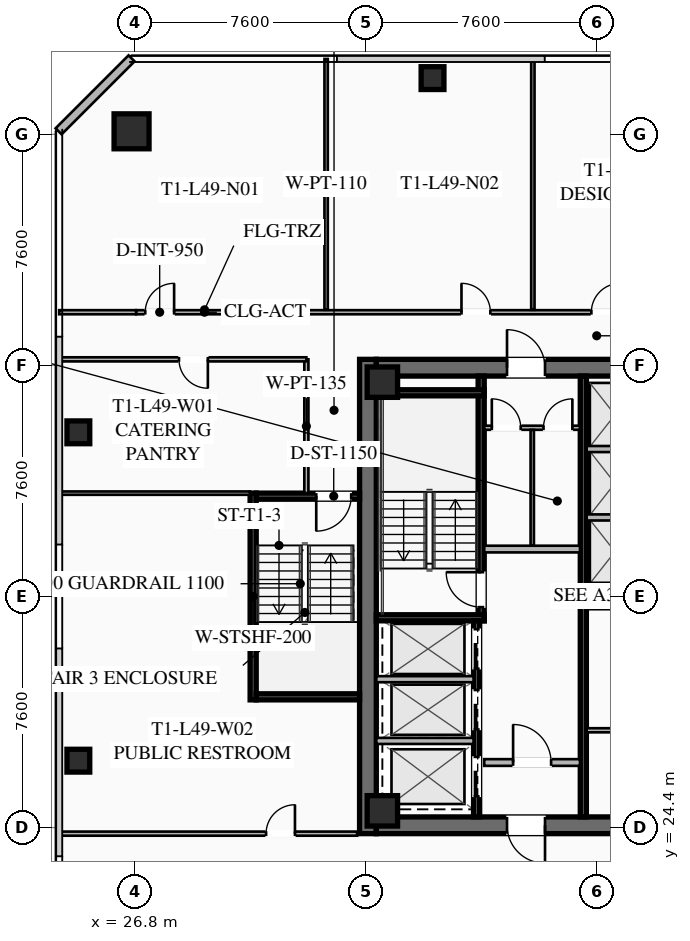
"""IFC4 building model, lengths in metres.
Left out: names, types, materials, properties, quantities, classifications, styles, units other than length and angle.
Written with IfcOpenShell. Run it as: python <this file> out.ifc"""

import sys

from ifc_helpers import new_model, si_unit, direction, frame, frame_2d, origin, origin_2d, place, context, subcontext, project, spatial, rectangle, hollow_rectangle, extrude, element, fill, save


model = new_model("IFC4")
c1 = context("Model", 3, precision=1e-05, world=origin(), true_north=direction((0.0, 1.0)))
c2 = subcontext(c1, "Body", "Model", "MODEL_VIEW")
j1 = project(units=[si_unit("LENGTHUNIT", "METRE"), si_unit("PLANEANGLEUNIT", "RADIAN")], contexts=[c1])
p1 = place(None, origin())
s1 = spatial("IfcSite", under=j1, at=p1, CompositionType="ELEMENT")
p2 = place(p1, origin())
s2 = spatial("IfcBuilding", under=s1, at=p2, CompositionType="ELEMENT")
p3 = place(p2, frame((0.0, 0.0, 181.85)))
s3 = spatial("IfcBuildingStorey", under=s2, at=p3, CompositionType="ELEMENT", Elevation=181.85)
p4 = place(p3, frame((34.475, 24.2, 0.0), z_axis=(0.0, 0.0, 1.0), x_axis=(0.0, 1.0, 0.0)))
e1 = element("IfcWall", 1, at=p4, inside=s3, PredefinedType="SHEAR", context=c2, shape_type="SweptSolid", body=[
    extrude(rectangle(XDim=15.6, YDim=0.55, at=frame_2d((7.8, 0.0))), origin(), (0.0, 0.0, 1.0), 3.55),
])
p5 = place(p3, frame((49.25, 24.475, 0.0), z_axis=(0.0, 0.0, 1.0), x_axis=(-1.0, 0.0, 0.0)))
e2 = element("IfcWall", 2, at=p5, inside=s3, PredefinedType="SHEAR", context=c2, shape_type="SweptSolid", body=[
    extrude(rectangle(XDim=14.5, YDim=0.55, at=frame_2d((7.25, 0.0))), origin(), (0.0, 0.0, 1.0), 3.55),
])
p6 = place(p5, frame((8.95, 0.0, 0.0)))
e3 = element("IfcOpeningElement", 3, at=p6, cuts=e2, PredefinedType="OPENING", context=c2, shape_type="SweptSolid", body=[
    extrude(rectangle(XDim=1.25, YDim=2.25, at=frame_2d((0.625, 1.125))), frame((0.0, 0.285, 0.0), z_axis=(0.0, -1.0, 0.0), x_axis=(1.0, 0.0, 0.0)), (0.0, 0.0, 1.0), 0.57),
])
p7 = place(p5, frame((3.9, 0.0, 0.0)))
e4 = element("IfcOpeningElement", 4, at=p7, cuts=e2, PredefinedType="OPENING", context=c2, shape_type="SweptSolid", body=[
    extrude(rectangle(XDim=1.25, YDim=2.25, at=frame_2d((0.625, 1.125))), frame((0.0, 0.285, 0.0), z_axis=(0.0, -1.0, 0.0), x_axis=(1.0, 0.0, 0.0)), (0.0, 0.0, 1.0), 0.57),
])
p8 = place(p3, frame((34.75, 39.525, 0.0), z_axis=(0.0, 0.0, 1.0), x_axis=(1.0, 0.0, 0.0)))
e5 = element("IfcWall", 5, at=p8, inside=s3, PredefinedType="SHEAR", context=c2, shape_type="SweptSolid", body=[
    extrude(rectangle(XDim=14.5, YDim=0.55, at=frame_2d((7.25, 0.0))), origin(), (0.0, 0.0, 1.0), 3.55),
])
p9 = place(p8, frame((4.3, 0.0, 0.0)))
e6 = element("IfcOpeningElement", 6, at=p9, cuts=e5, PredefinedType="OPENING", context=c2, shape_type="SweptSolid", body=[
    extrude(rectangle(XDim=1.25, YDim=2.25, at=frame_2d((0.625, 1.125))), frame((0.0, 0.285, 0.0), z_axis=(0.0, -1.0, 0.0), x_axis=(1.0, 0.0, 0.0)), (0.0, 0.0, 1.0), 0.57),
])
p10 = place(p8, frame((9.35, 0.0, 0.0)))
e7 = element("IfcOpeningElement", 7, at=p10, cuts=e5, PredefinedType="OPENING", context=c2, shape_type="SweptSolid", body=[
    extrude(rectangle(XDim=1.25, YDim=2.25, at=frame_2d((0.625, 1.125))), frame((0.0, 0.285, 0.0), z_axis=(0.0, -1.0, 0.0), x_axis=(1.0, 0.0, 0.0)), (0.0, 0.0, 1.0), 0.57),
])
for number, where, z_axis, x_axis in (
    (8, (34.95, 24.95, 0.0), (0.0, 0.0, 1.0), (1.0, 0.0, 0.0)),
    (9, (34.95, 39.05, 0.0), (0.0, 0.0, 1.0), (1.0, 0.0, 0.0)),
):
    element("IfcColumn", number, at=place(p3, frame(where, z_axis=z_axis, x_axis=x_axis)), inside=s3, PredefinedType="COLUMN", context=c2, shape_type="SweptSolid", body=[
        extrude(hollow_rectangle(XDim=1.0, YDim=1.0, WallThickness=0.04, at=origin_2d()), origin(), (0.0, 0.0, 1.0), 3.37),
    ])
p11 = place(p3, frame((26.7, 47.3, 0.0), z_axis=(0.0, 0.0, 1.0), x_axis=(1.0, 0.0, 0.0)))
e10 = element("IfcColumn", 10, at=p11, inside=s3, PredefinedType="COLUMN", context=c2, shape_type="SweptSolid", body=[
    extrude(hollow_rectangle(XDim=1.15, YDim=1.15, WallThickness=0.045, at=origin_2d()), origin(), (0.0, 0.0, 1.0), 3.37),
])
for number, where, z_axis, x_axis in (
    (11, (36.6, 49.05, 0.0), (0.0, 0.0, 1.0), (1.0, 0.0, 0.0)),
    (12, (24.95, 37.4, 0.0), (0.0, 0.0, 1.0), (1.0, 0.0, 0.0)),
    (13, (24.95, 26.6, 0.0), (0.0, 0.0, 1.0), (1.0, 0.0, 0.0)),
):
    element("IfcColumn", number, at=place(p3, frame(where, z_axis=z_axis, x_axis=x_axis)), inside=s3, PredefinedType="COLUMN", context=c2, shape_type="SweptSolid", body=[
        extrude(hollow_rectangle(XDim=0.75, YDim=0.75, WallThickness=0.032, at=origin_2d()), origin(), (0.0, 0.0, 1.0), 3.37),
    ])
p12 = place(p3, frame((24.3, 47.3, 0.0), z_axis=(0.0, 0.0, 1.0), x_axis=(0.707106781187, 0.707106781187, 0.0)))
e14 = element("IfcWall", 14, at=p12, inside=s3, PredefinedType="SOLIDWALL", context=c2, shape_type="SweptSolid", body=[
    extrude(rectangle(XDim=3.394, YDim=0.28, at=frame_2d((1.697, 0.0))), origin(), (0.0, 0.0, 1.0), 3.37),
])
p13 = place(p3, frame((38.2, 31.2, 0.0), z_axis=(0.0, 0.0, 1.0), x_axis=(0.0, 1.0, 0.0)))
e15 = element("IfcWall", 15, at=p13, inside=s3, PredefinedType="SHEAR", context=c2, shape_type="SweptSolid", body=[
    extrude(rectangle(XDim=8.05, YDim=0.2, at=frame_2d((4.025, 0.0))), origin(), (0.0, 0.0, 1.0), 3.37),
])
p14 = place(p13, frame((0.45, 0.0, 0.0)))
e16 = element("IfcOpeningElement", 16, at=p14, cuts=e15, PredefinedType="OPENING", context=c2, shape_type="SweptSolid", body=[
    extrude(rectangle(XDim=1.15, YDim=2.2, at=frame_2d((0.575, 1.1))), frame((0.0, 0.11, 0.0), z_axis=(0.0, -1.0, 0.0), x_axis=(1.0, 0.0, 0.0)), (0.0, 0.0, 1.0), 0.22),
])
for number, where, z_axis, x_axis in (
    (17, (34.75, 31.3, 0.0), (0.0, 0.0, 1.0), (1.0, 0.0, 0.0)),
    (18, (34.75, 38.7, 0.0), (0.0, 0.0, 1.0), (1.0, 0.0, 0.0)),
):
    element("IfcWall", number, at=place(p3, frame(where, z_axis=z_axis, x_axis=x_axis)), inside=s3, PredefinedType="SHEAR", context=c2, shape_type="SweptSolid", body=[
        extrude(rectangle(XDim=3.55, YDim=0.2, at=frame_2d((1.775, 0.0))), origin(), (0.0, 0.0, 1.0), 3.37),
    ])
p15 = place(p3, frame((41.56, 24.75, 0.0), z_axis=(0.0, 0.0, 1.0), x_axis=(0.0, 1.0, 0.0)))
e19 = element("IfcWall", 19, at=p15, inside=s3, PredefinedType="SHEAR", context=c2, shape_type="SweptSolid", body=[
    extrude(rectangle(XDim=14.5, YDim=0.2, at=frame_2d((7.25, 0.0))), origin(), (0.0, 0.0, 1.0), 3.37),
])
p16 = place(p3, frame((38.3, 33.56, 0.0), z_axis=(0.0, 0.0, 1.0), x_axis=(1.0, 0.0, 0.0)))
e20 = element("IfcWall", 20, at=p16, inside=s3, PredefinedType="SOLIDWALL", context=c2, shape_type="SweptSolid", body=[
    extrude(rectangle(XDim=3.15, YDim=0.22, at=frame_2d((1.575, 0.0))), origin(), (0.0, 0.0, 1.0), 2.723),
])
p17 = place(p3, frame((38.3, 26.54, 0.0), z_axis=(0.0, 0.0, 1.0), x_axis=(1.0, 0.0, 0.0)))
e21 = element("IfcWall", 21, at=p17, inside=s3, PredefinedType="SOLIDWALL", context=c2, shape_type="SweptSolid", body=[
    extrude(rectangle(XDim=3.15, YDim=0.22, at=frame_2d((1.575, 0.0))), origin(), (0.0, 0.0, 1.0), 2.723),
])
p18 = place(p17, frame((0.95, 0.0, 0.0)))
e22 = element("IfcOpeningElement", 22, at=p18, cuts=e21, PredefinedType="OPENING", context=c2, shape_type="SweptSolid", body=[
    extrude(rectangle(XDim=1.25, YDim=2.25, at=frame_2d((0.625, 1.125))), frame((0.0, 0.12, 0.0), z_axis=(0.0, -1.0, 0.0), x_axis=(1.0, 0.0, 0.0)), (0.0, 0.0, 1.0), 0.24),
])
p19 = place(p3, frame((38.05, 24.75, 0.0), z_axis=(0.0, 0.0, 1.0), x_axis=(0.0, 1.0, 0.0)))
e23 = element("IfcWall", 23, at=p19, inside=s3, PredefinedType="SHEAR", context=c2, shape_type="SweptSolid", body=[
    extrude(rectangle(XDim=6.45, YDim=0.2, at=frame_2d((3.225, 0.0))), origin(), (0.0, 0.0, 1.0), 3.37),
])
p20 = place(p19, frame((4.875, 0.0, 0.0)))
e24 = element("IfcOpeningElement", 24, at=p20, cuts=e23, PredefinedType="OPENING", context=c2, shape_type="SweptSolid", body=[
    extrude(rectangle(XDim=1.3, YDim=2.25, at=frame_2d((0.65, 1.125))), frame((0.0, 0.11, 0.0), z_axis=(0.0, -1.0, 0.0), x_axis=(1.0, 0.0, 0.0)), (0.0, 0.0, 1.0), 0.22),
])
p21 = place(p19, frame((2.875, 0.0, 0.0)))
e25 = element("IfcOpeningElement", 25, at=p21, cuts=e23, PredefinedType="OPENING", context=c2, shape_type="SweptSolid", body=[
    extrude(rectangle(XDim=1.3, YDim=2.25, at=frame_2d((0.65, 1.125))), frame((0.0, 0.11, 0.0), z_axis=(0.0, -1.0, 0.0), x_axis=(1.0, 0.0, 0.0)), (0.0, 0.0, 1.0), 0.22),
])
p22 = place(p19, frame((0.675, 0.0, 0.0)))
e26 = element("IfcOpeningElement", 26, at=p22, cuts=e23, PredefinedType="OPENING", context=c2, shape_type="SweptSolid", body=[
    extrude(rectangle(XDim=1.3, YDim=2.25, at=frame_2d((0.65, 1.125))), frame((0.0, 0.11, 0.0), z_axis=(0.0, -1.0, 0.0), x_axis=(1.0, 0.0, 0.0)), (0.0, 0.0, 1.0), 0.22),
])
for number, where, z_axis, x_axis in (
    (27, (34.75, 27.25, 0.0), (0.0, 0.0, 1.0), (1.0, 0.0, 0.0)),
    (28, (34.75, 29.28, 0.0), (0.0, 0.0, 1.0), (1.0, 0.0, 0.0)),
):
    element("IfcWall", number, at=place(p3, frame(where, z_axis=z_axis, x_axis=x_axis)), inside=s3, PredefinedType="SOLIDWALL", context=c2, shape_type="SweptSolid", body=[
        extrude(rectangle(XDim=3.2, YDim=0.2, at=frame_2d((1.6, 0.0))), origin(), (0.0, 0.0, 1.0), 3.37),
    ])
p23 = place(p3, frame((38.3, 37.55, 0.0), z_axis=(0.0, 0.0, 1.0), x_axis=(1.0, 0.0, 0.0)))
e29 = element("IfcWall", 29, at=p23, inside=s3, PredefinedType="PARTITIONING", context=c2, shape_type="SweptSolid", body=[
    extrude(rectangle(XDim=3.15, YDim=0.135, at=frame_2d((1.575, 0.0))), origin(), (0.0, 0.0, 1.0), 2.723),
])
p24 = place(p23, frame((0.25, 0.0, 0.0)))
e30 = element("IfcOpeningElement", 30, at=p24, cuts=e29, PredefinedType="OPENING", context=c2, shape_type="SweptSolid", body=[
    extrude(rectangle(XDim=0.95, YDim=2.05, at=frame_2d((0.475, 1.025))), frame((0.0, 0.077, 0.0), z_axis=(0.0, -1.0, 0.0), x_axis=(1.0, 0.0, 0.0)), (0.0, 0.0, 1.0), 0.155),
])
p25 = place(p23, frame((1.95, 0.0, 0.0)))
e31 = element("IfcOpeningElement", 31, at=p25, cuts=e29, PredefinedType="OPENING", context=c2, shape_type="SweptSolid", body=[
    extrude(rectangle(XDim=0.95, YDim=2.05, at=frame_2d((0.475, 1.025))), frame((0.0, 0.077, 0.0), z_axis=(0.0, -1.0, 0.0), x_axis=(1.0, 0.0, 0.0)), (0.0, 0.0, 1.0), 0.155),
])
p26 = place(p3, frame((39.88, 33.68, 0.0), z_axis=(0.0, 0.0, 1.0), x_axis=(0.0, 1.0, 0.0)))
e32 = element("IfcWall", 32, at=p26, inside=s3, PredefinedType="PARTITIONING", context=c2, shape_type="SweptSolid", body=[
    extrude(rectangle(XDim=3.8, YDim=0.11, at=frame_2d((1.9, 0.0))), origin(), (0.0, 0.0, 1.0), 2.723),
])
for number, where, z_axis, x_axis in (
    (33, (41.67, 31.65, 0.0), (0.0, 0.0, 1.0), (1.0, 0.0, 0.0)),
    (34, (41.67, 27.6, 0.0), (0.0, 0.0, 1.0), (1.0, 0.0, 0.0)),
):
    element("IfcWall", number, at=place(p3, frame(where, z_axis=z_axis, x_axis=x_axis)), inside=s3, PredefinedType="PARTITIONING", context=c2, shape_type="SweptSolid", body=[
        extrude(rectangle(XDim=1.88, YDim=0.135, at=frame_2d((0.94, 0.0))), origin(), (0.0, 0.0, 1.0), 2.723),
    ])
for number, where, z_axis, x_axis in (
    (35, (41.67, 32.35, 0.0), (0.0, 0.0, 1.0), (1.0, 0.0, 0.0)),
    (36, (41.67, 34.6, 0.0), (0.0, 0.0, 1.0), (1.0, 0.0, 0.0)),
    (37, (41.67, 36.85, 0.0), (0.0, 0.0, 1.0), (1.0, 0.0, 0.0)),
):
    element("IfcWall", number, at=place(p3, frame(where, z_axis=z_axis, x_axis=x_axis)), inside=s3, PredefinedType="SOLIDWALL", context=c2, shape_type="SweptSolid", body=[
        extrude(rectangle(XDim=1.88, YDim=0.2, at=frame_2d((0.94, 0.0))), origin(), (0.0, 0.0, 1.0), 3.37),
    ])
p27 = place(p3, frame((30.7, 28.6, 0.0), z_axis=(0.0, 0.0, 1.0), x_axis=(0.0, 1.0, 0.0)))
e38 = element("IfcWall", 38, at=p27, inside=s3, PredefinedType="SHEAR", context=c2, shape_type="SweptSolid", body=[
    extrude(rectangle(XDim=6.8, YDim=0.2, at=frame_2d((3.4, 0.0))), origin(), (0.0, 0.0, 1.0), 3.37),
])
p28 = place(p3, frame((34.2, 35.3, 0.0), z_axis=(0.0, 0.0, 1.0), x_axis=(-1.0, 0.0, 0.0)))
e39 = element("IfcWall", 39, at=p28, inside=s3, PredefinedType="SHEAR", context=c2, shape_type="SweptSolid", body=[
    extrude(rectangle(XDim=3.4, YDim=0.2, at=frame_2d((1.7, 0.0))), origin(), (0.0, 0.0, 1.0), 3.37),
])
p29 = place(p28, frame((0.275, 0.0, 0.0)))
e40 = element("IfcOpeningElement", 40, at=p29, cuts=e39, PredefinedType="OPENING", context=c2, shape_type="SweptSolid", body=[
    extrude(rectangle(XDim=1.15, YDim=2.2, at=frame_2d((0.575, 1.1))), frame((0.0, 0.11, 0.0), z_axis=(0.0, -1.0, 0.0), x_axis=(1.0, 0.0, 0.0)), (0.0, 0.0, 1.0), 0.22),
])
p30 = place(p3, frame((30.8, 28.7, 0.0), z_axis=(0.0, 0.0, 1.0), x_axis=(1.0, 0.0, 0.0)))
e41 = element("IfcWall", 41, at=p30, inside=s3, PredefinedType="SHEAR", context=c2, shape_type="SweptSolid", body=[
    extrude(rectangle(XDim=3.4, YDim=0.2, at=frame_2d((1.7, 0.0))), origin(), (0.0, 0.0, 1.0), 3.37),
])
p31 = place(p3, frame((32.45, 35.4, 0.0), z_axis=(0.0, 0.0, 1.0), x_axis=(0.0, 1.0, 0.0)))
e42 = element("IfcWall", 42, at=p31, inside=s3, PredefinedType="PARTITIONING", context=c2, shape_type="SweptSolid", body=[
    extrude(rectangle(XDim=4.4, YDim=0.135, at=frame_2d((2.2, 0.0))), origin(), (0.0, 0.0, 1.0), 2.723),
])
p32 = place(p3, frame((26.85, 41.35, 0.0), z_axis=(0.0, 0.0, 1.0), x_axis=(1.0, 0.0, 0.0)))
e43 = element("IfcWall", 43, at=p32, inside=s3, PredefinedType="PARTITIONING", context=c2, shape_type="SweptSolid", body=[
    extrude(rectangle(XDim=30.3, YDim=0.135, at=frame_2d((15.15, 0.0))), origin(), (0.0, 0.0, 1.0), 2.723),
])
p33 = place(p32, frame((0.3, 0.0, 0.0)))
e44 = element("IfcOpeningElement", 44, at=p33, cuts=e43, PredefinedType="OPENING", context=c2, shape_type="SweptSolid", body=[
    extrude(rectangle(XDim=0.95, YDim=2.05, at=frame_2d((0.475, 1.025))), frame((0.0, 0.077, 0.0), z_axis=(0.0, -1.0, 0.0), x_axis=(1.0, 0.0, 0.0)), (0.0, 0.0, 1.0), 0.155),
])
p34 = place(p32, frame((10.702, 0.0, 0.0)))
e45 = element("IfcOpeningElement", 45, at=p34, cuts=e43, PredefinedType="OPENING", context=c2, shape_type="SweptSolid", body=[
    extrude(rectangle(XDim=0.95, YDim=2.05, at=frame_2d((0.475, 1.025))), frame((0.0, 0.077, 0.0), z_axis=(0.0, -1.0, 0.0), x_axis=(1.0, 0.0, 0.0)), (0.0, 0.0, 1.0), 0.155),
])
p35 = place(p32, frame((14.974, 0.0, 0.0)))
e46 = element("IfcOpeningElement", 46, at=p35, cuts=e43, PredefinedType="OPENING", context=c2, shape_type="SweptSolid", body=[
    extrude(rectangle(XDim=0.95, YDim=2.05, at=frame_2d((0.475, 1.025))), frame((0.0, 0.077, 0.0), z_axis=(0.0, -1.0, 0.0), x_axis=(1.0, 0.0, 0.0)), (0.0, 0.0, 1.0), 0.155),
])
p36 = place(p32, frame((29.05, 0.0, 0.0)))
e47 = element("IfcOpeningElement", 47, at=p36, cuts=e43, PredefinedType="OPENING", context=c2, shape_type="SweptSolid", body=[
    extrude(rectangle(XDim=0.95, YDim=2.05, at=frame_2d((0.475, 1.025))), frame((0.0, 0.077, 0.0), z_axis=(0.0, -1.0, 0.0), x_axis=(1.0, 0.0, 0.0)), (0.0, 0.0, 1.0), 0.155),
])
p37 = place(p3, frame((24.32, 41.35, 0.0), z_axis=(0.0, 0.0, 1.0), x_axis=(1.0, 0.0, 0.0)))
e48 = element("IfcWall", 48, at=p37, inside=s3, PredefinedType="PARTITIONING", context=c2, shape_type="SweptSolid", body=[
    extrude(rectangle(XDim=2.53, YDim=0.135, at=frame_2d((1.265, 0.0))), origin(), (0.0, 0.0, 1.0), 2.723),
])
for number, where, z_axis, x_axis in (
    (49, (33.1, 41.43, 0.0), (0.0, 0.0, 1.0), (0.0, 1.0, 0.0)),
    (50, (39.9, 41.43, 0.0), (0.0, 0.0, 1.0), (0.0, 1.0, 0.0)),
):
    element("IfcWall", number, at=place(p3, frame(where, z_axis=z_axis, x_axis=x_axis)), inside=s3, PredefinedType="PARTITIONING", context=c2, shape_type="SweptSolid", body=[
        extrude(rectangle(XDim=8.25, YDim=0.11, at=frame_2d((4.125, 0.0))), origin(), (0.0, 0.0, 1.0), 2.723),
    ])
p38 = place(p3, frame((32.45, 39.8, 0.0), z_axis=(0.0, 0.0, 1.0), x_axis=(-1.0, 0.0, 0.0)))
e51 = element("IfcWall", 51, at=p38, inside=s3, PredefinedType="PARTITIONING", context=c2, shape_type="SweptSolid", body=[
    extrude(rectangle(XDim=8.13, YDim=0.135, at=frame_2d((4.065, 0.0))), origin(), (0.0, 0.0, 1.0), 2.723),
])
p39 = place(p38, frame((3.24, 0.0, 0.0)))
e52 = element("IfcOpeningElement", 52, at=p39, cuts=e51, PredefinedType="OPENING", context=c2, shape_type="SweptSolid", body=[
    extrude(rectangle(XDim=0.95, YDim=2.05, at=frame_2d((0.475, 1.025))), frame((0.0, 0.077, 0.0), z_axis=(0.0, -1.0, 0.0), x_axis=(1.0, 0.0, 0.0)), (0.0, 0.0, 1.0), 0.155),
])
p40 = place(p3, frame((24.32, 24.2, 0.0), z_axis=(0.0, 0.0, 1.0), x_axis=(1.0, 0.0, 0.0)))
e53 = element("IfcWall", 53, at=p40, inside=s3, PredefinedType="PARTITIONING", context=c2, shape_type="SweptSolid", body=[
    extrude(rectangle(XDim=9.8, YDim=0.135, at=frame_2d((4.9, 0.0))), origin(), (0.0, 0.0, 1.0), 2.723),
])
p41 = place(p40, frame((6.805, 0.0, 0.0)))
e54 = element("IfcOpeningElement", 54, at=p41, cuts=e53, PredefinedType="OPENING", context=c2, shape_type="SweptSolid", body=[
    extrude(rectangle(XDim=0.95, YDim=2.05, at=frame_2d((0.475, 1.025))), frame((0.0, 0.077, 0.0), z_axis=(0.0, -1.0, 0.0), x_axis=(1.0, 0.0, 0.0)), (0.0, 0.0, 1.0), 0.155),
])
p42 = place(p3, frame((30.6, 35.4, 0.0), z_axis=(0.0, 0.0, 1.0), x_axis=(-1.0, 0.0, 0.0)))
e55 = element("IfcWall", 55, at=p42, inside=s3, PredefinedType="PARTITIONING", context=c2, shape_type="SweptSolid", body=[
    extrude(rectangle(XDim=6.28, YDim=0.11, at=frame_2d((3.14, 0.0))), origin(), (0.0, 0.0, 1.0), 2.723),
])
p43 = place(p9, origin())
e56 = element("IfcDoor", 56, at=p43, inside=s3, OperationType="SINGLE_SWING_LEFT", PredefinedType="DOOR", context=c2, shape_type="SweptSolid", body=[
    extrude(rectangle(XDim=1.25, YDim=2.25, at=frame_2d((0.625, 1.125))), frame((0.0, 0.025, 0.0), z_axis=(0.0, -1.0, 0.0), x_axis=(1.0, 0.0, 0.0)), (0.0, 0.0, 1.0), 0.05),
])
fill(e6, e56)
p44 = place(p6, origin())
e57 = element("IfcDoor", 57, at=p44, inside=s3, OperationType="SINGLE_SWING_LEFT", PredefinedType="DOOR", context=c2, shape_type="SweptSolid", body=[
    extrude(rectangle(XDim=1.25, YDim=2.25, at=frame_2d((0.625, 1.125))), frame((0.0, 0.025, 0.0), z_axis=(0.0, -1.0, 0.0), x_axis=(1.0, 0.0, 0.0)), (0.0, 0.0, 1.0), 0.05),
])
fill(e3, e57)
p45 = place(p14, origin())
e58 = element("IfcDoor", 58, at=p45, inside=s3, OperationType="SINGLE_SWING_RIGHT", PredefinedType="DOOR", context=c2, shape_type="SweptSolid", body=[
    extrude(rectangle(XDim=1.15, YDim=2.2, at=frame_2d((0.575, 1.1))), frame((0.0, 0.025, 0.0), z_axis=(0.0, -1.0, 0.0), x_axis=(1.0, 0.0, 0.0)), (0.0, 0.0, 1.0), 0.05),
])
fill(e16, e58)
p46 = place(p18, origin())
e59 = element("IfcDoor", 59, at=p46, inside=s3, OperationType="SINGLE_SWING_LEFT", PredefinedType="DOOR", context=c2, shape_type="SweptSolid", body=[
    extrude(rectangle(XDim=1.25, YDim=2.25, at=frame_2d((0.625, 1.125))), frame((0.0, 0.025, 0.0), z_axis=(0.0, -1.0, 0.0), x_axis=(1.0, 0.0, 0.0)), (0.0, 0.0, 1.0), 0.05),
])
fill(e22, e59)
p47 = place(p24, origin())
e60 = element("IfcDoor", 60, at=p47, inside=s3, OperationType="SINGLE_SWING_LEFT", PredefinedType="DOOR", context=c2, shape_type="SweptSolid", body=[
    extrude(rectangle(XDim=0.95, YDim=2.05, at=frame_2d((0.475, 1.025))), frame((0.0, 0.025, 0.0), z_axis=(0.0, -1.0, 0.0), x_axis=(1.0, 0.0, 0.0)), (0.0, 0.0, 1.0), 0.05),
])
fill(e30, e60)
p48 = place(p25, origin())
e61 = element("IfcDoor", 61, at=p48, inside=s3, OperationType="SINGLE_SWING_RIGHT", PredefinedType="DOOR", context=c2, shape_type="SweptSolid", body=[
    extrude(rectangle(XDim=0.95, YDim=2.05, at=frame_2d((0.475, 1.025))), frame((0.0, 0.025, 0.0), z_axis=(0.0, -1.0, 0.0), x_axis=(1.0, 0.0, 0.0)), (0.0, 0.0, 1.0), 0.05),
])
fill(e31, e61)
p49 = place(p29, origin())
e62 = element("IfcDoor", 62, at=p49, inside=s3, OperationType="SINGLE_SWING_RIGHT", PredefinedType="DOOR", context=c2, shape_type="SweptSolid", body=[
    extrude(rectangle(XDim=1.15, YDim=2.2, at=frame_2d((0.575, 1.1))), frame((0.0, 0.025, 0.0), z_axis=(0.0, -1.0, 0.0), x_axis=(1.0, 0.0, 0.0)), (0.0, 0.0, 1.0), 0.05),
])
fill(e40, e62)
p50 = place(p33, origin())
e63 = element("IfcDoor", 63, at=p50, inside=s3, OperationType="SINGLE_SWING_RIGHT", PredefinedType="DOOR", context=c2, shape_type="SweptSolid", body=[
    extrude(rectangle(XDim=0.95, YDim=2.05, at=frame_2d((0.475, 1.025))), frame((0.0, 0.025, 0.0), z_axis=(0.0, -1.0, 0.0), x_axis=(1.0, 0.0, 0.0)), (0.0, 0.0, 1.0), 0.05),
])
fill(e44, e63)
p51 = place(p34, origin())
e64 = element("IfcDoor", 64, at=p51, inside=s3, OperationType="SINGLE_SWING_LEFT", PredefinedType="DOOR", context=c2, shape_type="SweptSolid", body=[
    extrude(rectangle(XDim=0.95, YDim=2.05, at=frame_2d((0.475, 1.025))), frame((0.0, 0.025, 0.0), z_axis=(0.0, -1.0, 0.0), x_axis=(1.0, 0.0, 0.0)), (0.0, 0.0, 1.0), 0.05),
])
fill(e45, e64)
p52 = place(p35, origin())
e65 = element("IfcDoor", 65, at=p52, inside=s3, OperationType="SINGLE_SWING_RIGHT", PredefinedType="DOOR", context=c2, shape_type="SweptSolid", body=[
    extrude(rectangle(XDim=0.95, YDim=2.05, at=frame_2d((0.475, 1.025))), frame((0.0, 0.025, 0.0), z_axis=(0.0, -1.0, 0.0), x_axis=(1.0, 0.0, 0.0)), (0.0, 0.0, 1.0), 0.05),
])
fill(e46, e65)
p53 = place(p39, origin())
e66 = element("IfcDoor", 66, at=p53, inside=s3, OperationType="SINGLE_SWING_LEFT", PredefinedType="DOOR", context=c2, shape_type="SweptSolid", body=[
    extrude(rectangle(XDim=0.95, YDim=2.05, at=frame_2d((0.475, 1.025))), frame((0.0, 0.025, 0.0), z_axis=(0.0, -1.0, 0.0), x_axis=(1.0, 0.0, 0.0)), (0.0, 0.0, 1.0), 0.05),
])
fill(e52, e66)
p54 = place(p41, origin())
e67 = element("IfcDoor", 67, at=p54, inside=s3, OperationType="SINGLE_SWING_RIGHT", PredefinedType="DOOR", context=c2, shape_type="SweptSolid", body=[
    extrude(rectangle(XDim=0.95, YDim=2.05, at=frame_2d((0.475, 1.025))), frame((0.0, 0.025, 0.0), z_axis=(0.0, -1.0, 0.0), x_axis=(1.0, 0.0, 0.0)), (0.0, 0.0, 1.0), 0.05),
])
fill(e54, e67)
p55 = place(p20, origin())
e68 = element("IfcDoor", 68, at=p55, inside=s3, OperationType="SLIDING_TO_LEFT", PredefinedType="DOOR", context=c2, shape_type="SweptSolid", body=[
    extrude(rectangle(XDim=1.3, YDim=2.25, at=frame_2d((0.65, 1.125))), frame((0.0, 0.025, 0.0), z_axis=(0.0, -1.0, 0.0), x_axis=(1.0, 0.0, 0.0)), (0.0, 0.0, 1.0), 0.05),
])
fill(e24, e68)
p56 = place(p21, origin())
e69 = element("IfcDoor", 69, at=p56, inside=s3, OperationType="SLIDING_TO_LEFT", PredefinedType="DOOR", context=c2, shape_type="SweptSolid", body=[
    extrude(rectangle(XDim=1.3, YDim=2.25, at=frame_2d((0.65, 1.125))), frame((0.0, 0.025, 0.0), z_axis=(0.0, -1.0, 0.0), x_axis=(1.0, 0.0, 0.0)), (0.0, 0.0, 1.0), 0.05),
])
fill(e25, e69)
p57 = place(p22, origin())
e70 = element("IfcDoor", 70, at=p57, inside=s3, OperationType="SLIDING_TO_LEFT", PredefinedType="DOOR", context=c2, shape_type="SweptSolid", body=[
    extrude(rectangle(XDim=1.3, YDim=2.25, at=frame_2d((0.65, 1.125))), frame((0.0, 0.025, 0.0), z_axis=(0.0, -1.0, 0.0), x_axis=(1.0, 0.0, 0.0)), (0.0, 0.0, 1.0), 0.05),
])
fill(e26, e70)
save(model, sys.argv[1])
